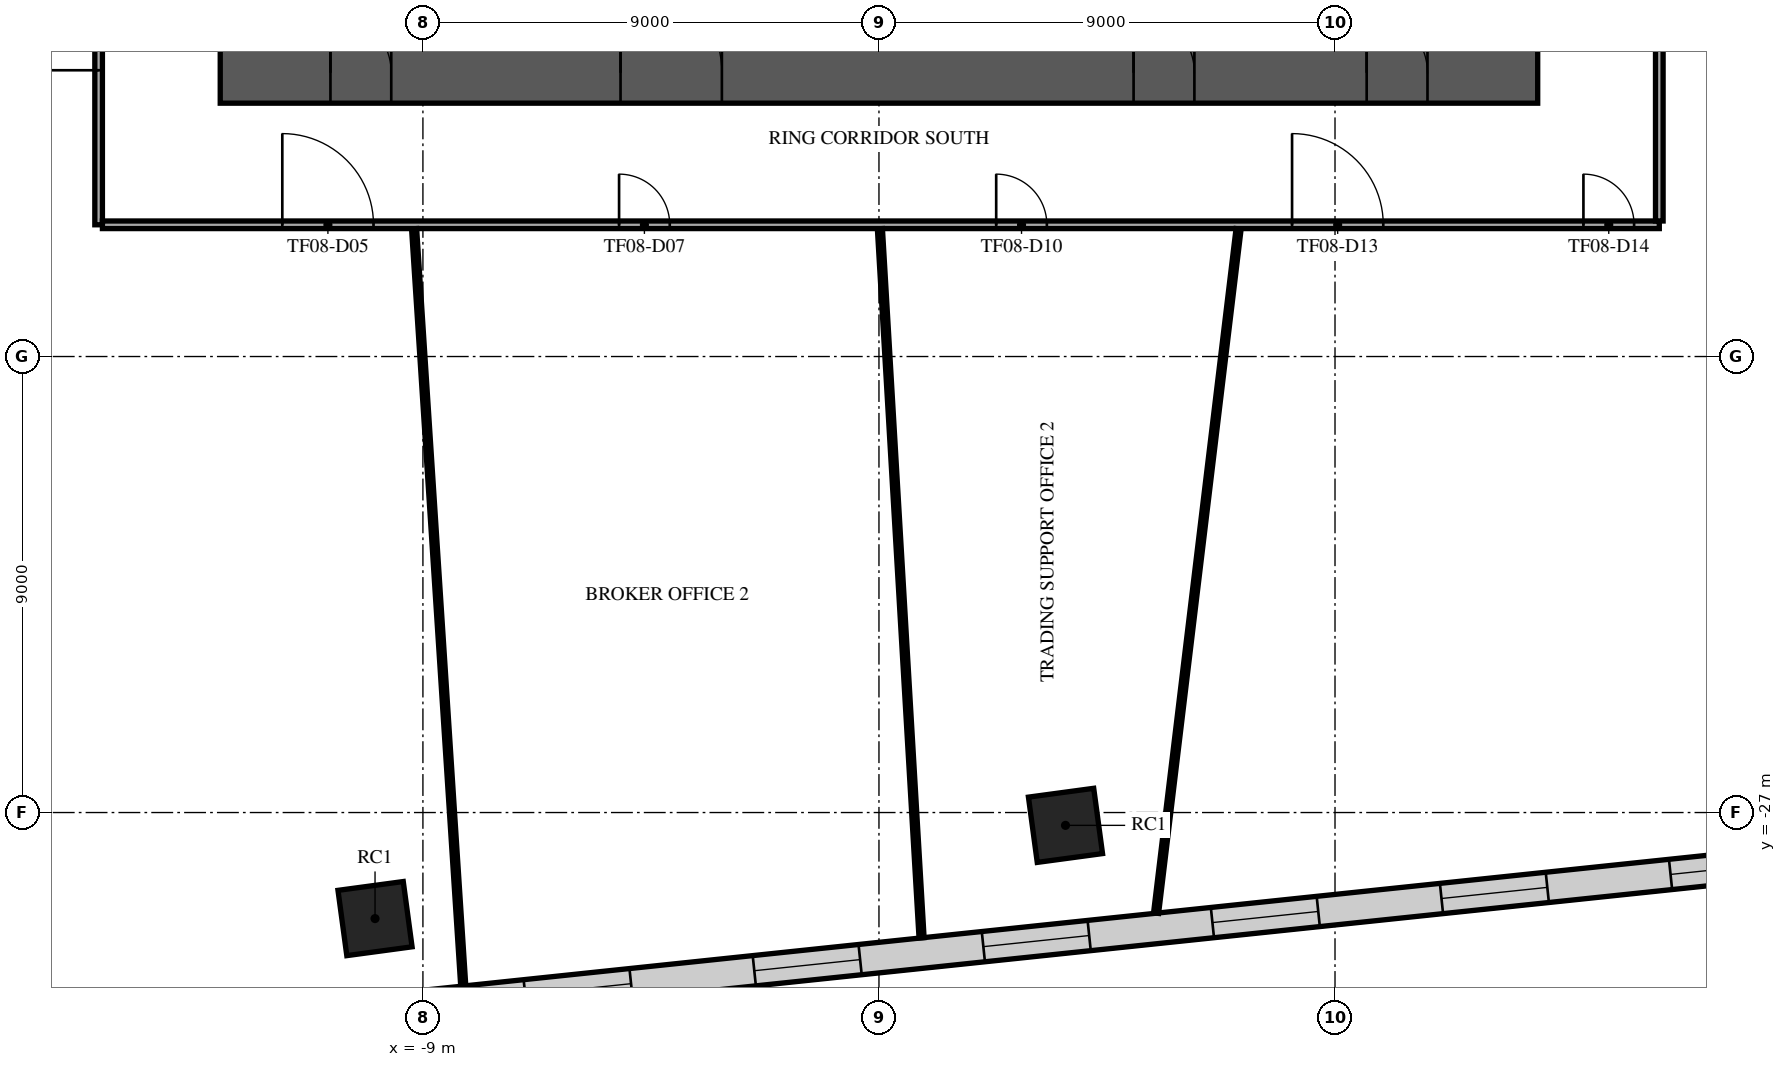
"""IFC4 building model, lengths in metres.
Left out: names, types, materials, properties, quantities, classifications, styles, units other than length and angle.
Written with IfcOpenShell. Run it as: python <this file> out.ifc"""

import sys

from ifc_helpers import new_model, si_unit, direction, frame, frame_2d, origin, origin_2d, place, context, subcontext, project, spatial, rectangle, extrude, element, fill, save


model = new_model("IFC4")
c1 = context("Model", 3, precision=1e-05, world=origin(), true_north=direction((0.0, 1.0)))
c2 = subcontext(c1, "Body", "Model", "MODEL_VIEW")
j1 = project(units=[si_unit("LENGTHUNIT", "METRE"), si_unit("PLANEANGLEUNIT", "RADIAN")], contexts=[c1])
p1 = place(None, origin())
s1 = spatial("IfcSite", under=j1, at=p1, CompositionType="ELEMENT")
p2 = place(p1, origin())
s2 = spatial("IfcBuilding", under=s1, at=p2, CompositionType="ELEMENT")
p3 = place(p2, frame((0.0, 0.0, 36.9)))
s3 = spatial("IfcBuildingStorey", under=s2, at=p3, CompositionType="ELEMENT", Elevation=36.9)
for number, where, z_axis, x_axis in (
    (1, (-9.945, -29.093, 0.0), (0.0, 0.0, 1.0), (0.991, 0.134, 0.0)),
    (2, (3.681, -27.253, 0.0), (0.0, 0.0, 1.0), (0.991, 0.134, 0.0)),
):
    element("IfcColumn", number, at=place(p3, frame(where, z_axis=z_axis, x_axis=x_axis)), inside=s3, PredefinedType="COLUMN", context=c2, shape_type="SweptSolid", body=[
        extrude(rectangle(XDim=1.3, YDim=1.3, at=origin_2d()), origin(), (0.0, 0.0, 1.0), 4.8),
    ])
p4 = place(p3, frame((-13.0, -12.4, 0.0), z_axis=(0.0, 0.0, 1.0), x_axis=(1.0, 0.0, 0.0)))
e3 = element("IfcWall", 3, at=p4, inside=s3, PredefinedType="SHEAR", context=c2, shape_type="SweptSolid", body=[
    extrude(rectangle(XDim=26.0, YDim=1.2, at=frame_2d((13.0, 0.0))), origin(), (0.0, 0.0, 1.0), 4.35),
])
p5 = place(p4, frame((7.9, 0.0, 0.0)))
e4 = element("IfcOpeningElement", 4, at=p5, cuts=e3, PredefinedType="OPENING", context=c2, shape_type="SweptSolid", body=[
    extrude(rectangle(XDim=2.0, YDim=2.1, at=frame_2d((1.0, 1.05))), frame((0.0, 0.61, 0.0), z_axis=(0.0, -1.0, 0.0), x_axis=(1.0, 0.0, 0.0)), (0.0, 0.0, 1.0), 1.22),
])
p6 = place(p4, frame((18.025, 0.0, 0.0)))
e5 = element("IfcOpeningElement", 5, at=p6, cuts=e3, PredefinedType="OPENING", context=c2, shape_type="SweptSolid", body=[
    extrude(rectangle(XDim=1.2, YDim=2.1, at=frame_2d((0.6, 1.05))), frame((0.0, 0.61, 0.0), z_axis=(0.0, -1.0, 0.0), x_axis=(1.0, 0.0, 0.0)), (0.0, 0.0, 1.0), 1.22),
])
p7 = place(p4, frame((2.175, 0.0, 0.0)))
e6 = element("IfcOpeningElement", 6, at=p7, cuts=e3, PredefinedType="OPENING", context=c2, shape_type="SweptSolid", body=[
    extrude(rectangle(XDim=1.2, YDim=2.1, at=frame_2d((0.6, 1.05))), frame((0.0, 0.61, 0.0), z_axis=(0.0, -1.0, 0.0), x_axis=(1.0, 0.0, 0.0)), (0.0, 0.0, 1.0), 1.22),
])
p8 = place(p4, frame((22.625, 0.0, 0.0)))
e7 = element("IfcOpeningElement", 7, at=p8, cuts=e3, PredefinedType="OPENING", context=c2, shape_type="SweptSolid", body=[
    extrude(rectangle(XDim=1.2, YDim=2.1, at=frame_2d((0.6, 1.05))), frame((0.0, 0.61, 0.0), z_axis=(0.0, -1.0, 0.0), x_axis=(1.0, 0.0, 0.0)), (0.0, 0.0, 1.0), 1.22),
])
p9 = place(p3, frame((-21.635, -32.137, 0.0), z_axis=(0.0, 0.0, 1.0), x_axis=(0.994521923397, 0.104528196591, 0.0)))
e8 = element("IfcWall", 8, at=p9, inside=s3, PredefinedType="STANDARD", context=c2, shape_type="SweptSolid", body=[
    extrude(rectangle(XDim=49.751, YDim=0.6, at=frame_2d((24.876, 0.0))), origin(), (0.0, 0.0, 1.0), 4.35),
])
p10 = place(p9, frame((1.161, 0.0, 0.9)))
e9 = element("IfcOpeningElement", 9, at=p10, cuts=e8, PredefinedType="OPENING", context=c2, shape_type="SweptSolid", body=[
    extrude(rectangle(XDim=2.1, YDim=2.7, at=frame_2d((1.05, 1.35))), frame((0.0, 0.31, 0.0), z_axis=(0.0, -1.0, 0.0), x_axis=(1.0, 0.0, 0.0)), (0.0, 0.0, 1.0), 0.62),
])
p11 = place(p9, frame((5.644, 0.0, 0.9)))
e10 = element("IfcOpeningElement", 10, at=p11, cuts=e8, PredefinedType="OPENING", context=c2, shape_type="SweptSolid", body=[
    extrude(rectangle(XDim=2.1, YDim=2.7, at=frame_2d((1.05, 1.35))), frame((0.0, 0.31, 0.0), z_axis=(0.0, -1.0, 0.0), x_axis=(1.0, 0.0, 0.0)), (0.0, 0.0, 1.0), 0.62),
])
p12 = place(p9, frame((10.189, 0.0, 0.9)))
e11 = element("IfcOpeningElement", 11, at=p12, cuts=e8, PredefinedType="OPENING", context=c2, shape_type="SweptSolid", body=[
    extrude(rectangle(XDim=2.1, YDim=2.7, at=frame_2d((1.05, 1.35))), frame((0.0, 0.31, 0.0), z_axis=(0.0, -1.0, 0.0), x_axis=(1.0, 0.0, 0.0)), (0.0, 0.0, 1.0), 0.62),
])
p13 = place(p9, frame((14.735, 0.0, 0.9)))
e12 = element("IfcOpeningElement", 12, at=p13, cuts=e8, PredefinedType="OPENING", context=c2, shape_type="SweptSolid", body=[
    extrude(rectangle(XDim=2.1, YDim=2.7, at=frame_2d((1.05, 1.35))), frame((0.0, 0.31, 0.0), z_axis=(0.0, -1.0, 0.0), x_axis=(1.0, 0.0, 0.0)), (0.0, 0.0, 1.0), 0.62),
])
p14 = place(p9, frame((19.28, 0.0, 0.9)))
e13 = element("IfcOpeningElement", 13, at=p14, cuts=e8, PredefinedType="OPENING", context=c2, shape_type="SweptSolid", body=[
    extrude(rectangle(XDim=2.1, YDim=2.7, at=frame_2d((1.05, 1.35))), frame((0.0, 0.31, 0.0), z_axis=(0.0, -1.0, 0.0), x_axis=(1.0, 0.0, 0.0)), (0.0, 0.0, 1.0), 0.62),
])
p15 = place(p9, frame((23.826, 0.0, 0.9)))
e14 = element("IfcOpeningElement", 14, at=p15, cuts=e8, PredefinedType="OPENING", context=c2, shape_type="SweptSolid", body=[
    extrude(rectangle(XDim=2.1, YDim=2.7, at=frame_2d((1.05, 1.35))), frame((0.0, 0.31, 0.0), z_axis=(0.0, -1.0, 0.0), x_axis=(1.0, 0.0, 0.0)), (0.0, 0.0, 1.0), 0.62),
])
p16 = place(p9, frame((28.371, 0.0, 0.9)))
e15 = element("IfcOpeningElement", 15, at=p16, cuts=e8, PredefinedType="OPENING", context=c2, shape_type="SweptSolid", body=[
    extrude(rectangle(XDim=2.1, YDim=2.7, at=frame_2d((1.05, 1.35))), frame((0.0, 0.31, 0.0), z_axis=(0.0, -1.0, 0.0), x_axis=(1.0, 0.0, 0.0)), (0.0, 0.0, 1.0), 0.62),
])
p17 = place(p9, frame((32.917, 0.0, 0.9)))
e16 = element("IfcOpeningElement", 16, at=p17, cuts=e8, PredefinedType="OPENING", context=c2, shape_type="SweptSolid", body=[
    extrude(rectangle(XDim=2.1, YDim=2.7, at=frame_2d((1.05, 1.35))), frame((0.0, 0.31, 0.0), z_axis=(0.0, -1.0, 0.0), x_axis=(1.0, 0.0, 0.0)), (0.0, 0.0, 1.0), 0.62),
])
p18 = place(p9, frame((37.462, 0.0, 0.9)))
e17 = element("IfcOpeningElement", 17, at=p18, cuts=e8, PredefinedType="OPENING", context=c2, shape_type="SweptSolid", body=[
    extrude(rectangle(XDim=2.1, YDim=2.7, at=frame_2d((1.05, 1.35))), frame((0.0, 0.31, 0.0), z_axis=(0.0, -1.0, 0.0), x_axis=(1.0, 0.0, 0.0)), (0.0, 0.0, 1.0), 0.62),
])
p19 = place(p9, frame((42.008, 0.0, 0.9)))
e18 = element("IfcOpeningElement", 18, at=p19, cuts=e8, PredefinedType="OPENING", context=c2, shape_type="SweptSolid", body=[
    extrude(rectangle(XDim=2.1, YDim=2.7, at=frame_2d((1.05, 1.35))), frame((0.0, 0.31, 0.0), z_axis=(0.0, -1.0, 0.0), x_axis=(1.0, 0.0, 0.0)), (0.0, 0.0, 1.0), 0.62),
])
p20 = place(p9, frame((46.491, 0.0, 0.9)))
e19 = element("IfcOpeningElement", 19, at=p20, cuts=e8, PredefinedType="OPENING", context=c2, shape_type="SweptSolid", body=[
    extrude(rectangle(XDim=2.1, YDim=2.7, at=frame_2d((1.05, 1.35))), frame((0.0, 0.31, 0.0), z_axis=(0.0, -1.0, 0.0), x_axis=(1.0, 0.0, 0.0)), (0.0, 0.0, 1.0), 0.62),
])
p21 = place(p3, frame((-15.4, -15.4, 0.0), z_axis=(0.0, 0.0, 1.0), x_axis=(0.0, 1.0, 0.0)))
e20 = element("IfcWall", 20, at=p21, inside=s3, PredefinedType="PARTITIONING", context=c2, shape_type="SweptSolid", body=[
    extrude(rectangle(XDim=30.8, YDim=0.15, at=frame_2d((15.4, 0.0))), origin(), (0.0, 0.0, 1.0), 3.85),
])
p22 = place(p21, frame((17.735, 0.0, 0.0)))
e21 = element("IfcOpeningElement", 21, at=p22, cuts=e20, PredefinedType="OPENING", context=c2, shape_type="SweptSolid", body=[
    extrude(rectangle(XDim=1.0, YDim=2.1, at=frame_2d((0.5, 1.05))), frame((0.0, 0.085, 0.0), z_axis=(0.0, -1.0, 0.0), x_axis=(1.0, 0.0, 0.0)), (0.0, 0.0, 1.0), 0.17),
])
p23 = place(p21, frame((9.836, 0.0, 0.0)))
e22 = element("IfcOpeningElement", 22, at=p23, cuts=e20, PredefinedType="OPENING", context=c2, shape_type="SweptSolid", body=[
    extrude(rectangle(XDim=1.0, YDim=2.1, at=frame_2d((0.5, 1.05))), frame((0.0, 0.085, 0.0), z_axis=(0.0, -1.0, 0.0), x_axis=(1.0, 0.0, 0.0)), (0.0, 0.0, 1.0), 0.17),
])
p24 = place(p21, frame((25.96, 0.0, 0.0)))
e23 = element("IfcOpeningElement", 23, at=p24, cuts=e20, PredefinedType="OPENING", context=c2, shape_type="SweptSolid", body=[
    extrude(rectangle(XDim=1.0, YDim=2.1, at=frame_2d((0.5, 1.05))), frame((0.0, 0.085, 0.0), z_axis=(0.0, -1.0, 0.0), x_axis=(1.0, 0.0, 0.0)), (0.0, 0.0, 1.0), 0.17),
])
p25 = place(p21, frame((3.05, 0.0, 0.0)))
e24 = element("IfcOpeningElement", 24, at=p25, cuts=e20, PredefinedType="OPENING", context=c2, shape_type="SweptSolid", body=[
    extrude(rectangle(XDim=1.0, YDim=2.1, at=frame_2d((0.5, 1.05))), frame((0.0, 0.085, 0.0), z_axis=(0.0, -1.0, 0.0), x_axis=(1.0, 0.0, 0.0)), (0.0, 0.0, 1.0), 0.17),
])
p26 = place(p3, frame((-15.325, -15.4, 0.0), z_axis=(0.0, 0.0, 1.0), x_axis=(1.0, 0.0, 0.0)))
e25 = element("IfcWall", 25, at=p26, inside=s3, PredefinedType="PARTITIONING", context=c2, shape_type="SweptSolid", body=[
    extrude(rectangle(XDim=30.725, YDim=0.15, at=frame_2d((15.362, 0.0))), origin(), (0.0, 0.0, 1.0), 3.85),
])
p27 = place(p26, frame((3.55, 0.0, 0.0)))
e26 = element("IfcOpeningElement", 26, at=p27, cuts=e25, PredefinedType="OPENING", context=c2, shape_type="SweptSolid", body=[
    extrude(rectangle(XDim=1.8, YDim=2.1, at=frame_2d((0.9, 1.05))), frame((0.0, 0.085, 0.0), z_axis=(0.0, -1.0, 0.0), x_axis=(1.0, 0.0, 0.0)), (0.0, 0.0, 1.0), 0.17),
])
p28 = place(p26, frame((10.196, 0.0, 0.0)))
e27 = element("IfcOpeningElement", 27, at=p28, cuts=e25, PredefinedType="OPENING", context=c2, shape_type="SweptSolid", body=[
    extrude(rectangle(XDim=1.0, YDim=2.1, at=frame_2d((0.5, 1.05))), frame((0.0, 0.085, 0.0), z_axis=(0.0, -1.0, 0.0), x_axis=(1.0, 0.0, 0.0)), (0.0, 0.0, 1.0), 0.17),
])
p29 = place(p26, frame((17.638, 0.0, 0.0)))
e28 = element("IfcOpeningElement", 28, at=p29, cuts=e25, PredefinedType="OPENING", context=c2, shape_type="SweptSolid", body=[
    extrude(rectangle(XDim=1.0, YDim=2.1, at=frame_2d((0.5, 1.05))), frame((0.0, 0.085, 0.0), z_axis=(0.0, -1.0, 0.0), x_axis=(1.0, 0.0, 0.0)), (0.0, 0.0, 1.0), 0.17),
])
p30 = place(p26, frame((23.478, 0.0, 0.0)))
e29 = element("IfcOpeningElement", 29, at=p30, cuts=e25, PredefinedType="OPENING", context=c2, shape_type="SweptSolid", body=[
    extrude(rectangle(XDim=1.8, YDim=2.1, at=frame_2d((0.9, 1.05))), frame((0.0, 0.085, 0.0), z_axis=(0.0, -1.0, 0.0), x_axis=(1.0, 0.0, 0.0)), (0.0, 0.0, 1.0), 0.17),
])
p31 = place(p26, frame((29.228, 0.0, 0.0)))
e30 = element("IfcOpeningElement", 30, at=p31, cuts=e25, PredefinedType="OPENING", context=c2, shape_type="SweptSolid", body=[
    extrude(rectangle(XDim=1.0, YDim=2.1, at=frame_2d((0.5, 1.05))), frame((0.0, 0.085, 0.0), z_axis=(0.0, -1.0, 0.0), x_axis=(1.0, 0.0, 0.0)), (0.0, 0.0, 1.0), 0.17),
])
p32 = place(p3, frame((15.4, -15.325, 0.0), z_axis=(0.0, 0.0, 1.0), x_axis=(0.0, 1.0, 0.0)))
e31 = element("IfcWall", 31, at=p32, inside=s3, PredefinedType="PARTITIONING", context=c2, shape_type="SweptSolid", body=[
    extrude(rectangle(XDim=30.65, YDim=0.15, at=frame_2d((15.325, 0.0))), origin(), (0.0, 0.0, 1.0), 3.85),
])
p33 = place(p32, frame((19.986, 0.0, 0.0)))
e32 = element("IfcOpeningElement", 32, at=p33, cuts=e31, PredefinedType="OPENING", context=c2, shape_type="SweptSolid", body=[
    extrude(rectangle(XDim=1.0, YDim=2.1, at=frame_2d((0.5, 1.05))), frame((0.0, 0.085, 0.0), z_axis=(0.0, -1.0, 0.0), x_axis=(1.0, 0.0, 0.0)), (0.0, 0.0, 1.0), 0.17),
])
p34 = place(p32, frame((8.197, 0.0, 0.0)))
e33 = element("IfcOpeningElement", 33, at=p34, cuts=e31, PredefinedType="OPENING", context=c2, shape_type="SweptSolid", body=[
    extrude(rectangle(XDim=1.0, YDim=2.1, at=frame_2d((0.5, 1.05))), frame((0.0, 0.085, 0.0), z_axis=(0.0, -1.0, 0.0), x_axis=(1.0, 0.0, 0.0)), (0.0, 0.0, 1.0), 0.17),
])
p35 = place(p3, frame((-9.174, -15.478, 0.0), z_axis=(0.0, 0.0, 1.0), x_axis=(0.064755162469, -0.997901181948, 0.0)))
e34 = element("IfcWall", 34, at=p35, inside=s3, PredefinedType="PARTITIONING", context=c2, shape_type="SweptSolid", body=[
    extrude(rectangle(XDim=14.975, YDim=0.1, at=frame_2d((7.488, 0.0))), origin(), (0.0, 0.0, 1.0), 3.55),
])
p36 = place(p3, frame((0.019, -15.478, 0.0), z_axis=(0.0, 0.0, 1.0), x_axis=(0.058657702067, -0.998278154618, 0.0)))
e35 = element("IfcWall", 35, at=p36, inside=s3, PredefinedType="PARTITIONING", context=c2, shape_type="SweptSolid", body=[
    extrude(rectangle(XDim=14.018, YDim=0.1, at=frame_2d((7.009, 0.0))), origin(), (0.0, 0.0, 1.0), 3.55),
])
p37 = place(p3, frame((5.469, -28.985, 0.0), z_axis=(0.0, 0.0, 1.0), x_axis=(0.119701505931, 0.992809926158, 0.0)))
e36 = element("IfcWall", 36, at=p37, inside=s3, PredefinedType="PARTITIONING", context=c2, shape_type="SweptSolid", body=[
    extrude(rectangle(XDim=13.602, YDim=0.1, at=frame_2d((6.801, 0.0))), origin(), (0.0, 0.0, 1.0), 3.55),
])
p38 = place(p5, origin())
e37 = element("IfcDoor", 37, at=p38, inside=s3, OperationType="SINGLE_SWING_LEFT", PredefinedType="DOOR", context=c2, shape_type="SweptSolid", body=[
    extrude(rectangle(XDim=2.0, YDim=2.1, at=frame_2d((1.0, 1.05))), frame((0.0, 0.025, 0.0), z_axis=(0.0, -1.0, 0.0), x_axis=(1.0, 0.0, 0.0)), (0.0, 0.0, 1.0), 0.05),
])
fill(e4, e37)
p39 = place(p6, origin())
e38 = element("IfcDoor", 38, at=p39, inside=s3, OperationType="SINGLE_SWING_LEFT", PredefinedType="DOOR", context=c2, shape_type="SweptSolid", body=[
    extrude(rectangle(XDim=1.2, YDim=2.1, at=frame_2d((0.6, 1.05))), frame((0.0, 0.025, 0.0), z_axis=(0.0, -1.0, 0.0), x_axis=(1.0, 0.0, 0.0)), (0.0, 0.0, 1.0), 0.05),
])
fill(e5, e38)
p40 = place(p7, origin())
e39 = element("IfcDoor", 39, at=p40, inside=s3, OperationType="SINGLE_SWING_LEFT", PredefinedType="DOOR", context=c2, shape_type="SweptSolid", body=[
    extrude(rectangle(XDim=1.2, YDim=2.1, at=frame_2d((0.6, 1.05))), frame((0.0, 0.025, 0.0), z_axis=(0.0, -1.0, 0.0), x_axis=(1.0, 0.0, 0.0)), (0.0, 0.0, 1.0), 0.05),
])
fill(e6, e39)
p41 = place(p8, origin())
e40 = element("IfcDoor", 40, at=p41, inside=s3, OperationType="SINGLE_SWING_LEFT", PredefinedType="DOOR", context=c2, shape_type="SweptSolid", body=[
    extrude(rectangle(XDim=1.2, YDim=2.1, at=frame_2d((0.6, 1.05))), frame((0.0, 0.025, 0.0), z_axis=(0.0, -1.0, 0.0), x_axis=(1.0, 0.0, 0.0)), (0.0, 0.0, 1.0), 0.05),
])
fill(e7, e40)
p42 = place(p13, origin())
e41 = element("IfcWindow", 41, at=p42, inside=s3, PartitioningType="SINGLE_PANEL", PredefinedType="WINDOW", context=c2, shape_type="SweptSolid", body=[
    extrude(rectangle(XDim=2.1, YDim=2.7, at=frame_2d((1.05, 1.35))), frame((0.0, 0.03, 0.0), z_axis=(0.0, -1.0, 0.0), x_axis=(1.0, 0.0, 0.0)), (0.0, 0.0, 1.0), 0.06),
])
fill(e12, e41)
p43 = place(p14, origin())
e42 = element("IfcWindow", 42, at=p43, inside=s3, PartitioningType="SINGLE_PANEL", PredefinedType="WINDOW", context=c2, shape_type="SweptSolid", body=[
    extrude(rectangle(XDim=2.1, YDim=2.7, at=frame_2d((1.05, 1.35))), frame((0.0, 0.03, 0.0), z_axis=(0.0, -1.0, 0.0), x_axis=(1.0, 0.0, 0.0)), (0.0, 0.0, 1.0), 0.06),
])
fill(e13, e42)
p44 = place(p15, origin())
e43 = element("IfcWindow", 43, at=p44, inside=s3, PartitioningType="SINGLE_PANEL", PredefinedType="WINDOW", context=c2, shape_type="SweptSolid", body=[
    extrude(rectangle(XDim=2.1, YDim=2.7, at=frame_2d((1.05, 1.35))), frame((0.0, 0.03, 0.0), z_axis=(0.0, -1.0, 0.0), x_axis=(1.0, 0.0, 0.0)), (0.0, 0.0, 1.0), 0.06),
])
fill(e14, e43)
p45 = place(p16, origin())
e44 = element("IfcWindow", 44, at=p45, inside=s3, PartitioningType="SINGLE_PANEL", PredefinedType="WINDOW", context=c2, shape_type="SweptSolid", body=[
    extrude(rectangle(XDim=2.1, YDim=2.7, at=frame_2d((1.05, 1.35))), frame((0.0, 0.03, 0.0), z_axis=(0.0, -1.0, 0.0), x_axis=(1.0, 0.0, 0.0)), (0.0, 0.0, 1.0), 0.06),
])
fill(e15, e44)
p46 = place(p17, origin())
e45 = element("IfcWindow", 45, at=p46, inside=s3, PartitioningType="SINGLE_PANEL", PredefinedType="WINDOW", context=c2, shape_type="SweptSolid", body=[
    extrude(rectangle(XDim=2.1, YDim=2.7, at=frame_2d((1.05, 1.35))), frame((0.0, 0.03, 0.0), z_axis=(0.0, -1.0, 0.0), x_axis=(1.0, 0.0, 0.0)), (0.0, 0.0, 1.0), 0.06),
])
fill(e16, e45)
p47 = place(p18, origin())
e46 = element("IfcWindow", 46, at=p47, inside=s3, PartitioningType="SINGLE_PANEL", PredefinedType="WINDOW", context=c2, shape_type="SweptSolid", body=[
    extrude(rectangle(XDim=2.1, YDim=2.7, at=frame_2d((1.05, 1.35))), frame((0.0, 0.03, 0.0), z_axis=(0.0, -1.0, 0.0), x_axis=(1.0, 0.0, 0.0)), (0.0, 0.0, 1.0), 0.06),
])
fill(e17, e46)
p48 = place(p27, frame((1.8, 0.0, 0.0), z_axis=(0.0, 0.0, 1.0), x_axis=(-1.0, 0.0, 0.0)))
e47 = element("IfcDoor", 47, at=p48, inside=s3, OperationType="DOUBLE_DOOR_SINGLE_SWING", PredefinedType="DOOR", context=c2, shape_type="SweptSolid", body=[
    extrude(rectangle(XDim=1.8, YDim=2.1, at=frame_2d((0.9, 1.05))), frame((0.0, 0.025, 0.0), z_axis=(0.0, -1.0, 0.0), x_axis=(1.0, 0.0, 0.0)), (0.0, 0.0, 1.0), 0.05),
])
fill(e26, e47)
p49 = place(p25, origin())
e48 = element("IfcDoor", 48, at=p49, inside=s3, OperationType="SINGLE_SWING_LEFT", PredefinedType="DOOR", context=c2, shape_type="SweptSolid", body=[
    extrude(rectangle(XDim=1.0, YDim=2.1, at=frame_2d((0.5, 1.05))), frame((0.0, 0.025, 0.0), z_axis=(0.0, -1.0, 0.0), x_axis=(1.0, 0.0, 0.0)), (0.0, 0.0, 1.0), 0.05),
])
fill(e24, e48)
p50 = place(p28, frame((1.0, 0.0, 0.0), z_axis=(0.0, 0.0, 1.0), x_axis=(-1.0, 0.0, 0.0)))
e49 = element("IfcDoor", 49, at=p50, inside=s3, OperationType="SINGLE_SWING_RIGHT", PredefinedType="DOOR", context=c2, shape_type="SweptSolid", body=[
    extrude(rectangle(XDim=1.0, YDim=2.1, at=frame_2d((0.5, 1.05))), frame((0.0, 0.025, 0.0), z_axis=(0.0, -1.0, 0.0), x_axis=(1.0, 0.0, 0.0)), (0.0, 0.0, 1.0), 0.05),
])
fill(e27, e49)
p51 = place(p29, frame((1.0, 0.0, 0.0), z_axis=(0.0, 0.0, 1.0), x_axis=(-1.0, 0.0, 0.0)))
e50 = element("IfcDoor", 50, at=p51, inside=s3, OperationType="SINGLE_SWING_RIGHT", PredefinedType="DOOR", context=c2, shape_type="SweptSolid", body=[
    extrude(rectangle(XDim=1.0, YDim=2.1, at=frame_2d((0.5, 1.05))), frame((0.0, 0.025, 0.0), z_axis=(0.0, -1.0, 0.0), x_axis=(1.0, 0.0, 0.0)), (0.0, 0.0, 1.0), 0.05),
])
fill(e28, e50)
p52 = place(p30, frame((1.8, 0.0, 0.0), z_axis=(0.0, 0.0, 1.0), x_axis=(-1.0, 0.0, 0.0)))
e51 = element("IfcDoor", 51, at=p52, inside=s3, OperationType="DOUBLE_DOOR_SINGLE_SWING", PredefinedType="DOOR", context=c2, shape_type="SweptSolid", body=[
    extrude(rectangle(XDim=1.8, YDim=2.1, at=frame_2d((0.9, 1.05))), frame((0.0, 0.025, 0.0), z_axis=(0.0, -1.0, 0.0), x_axis=(1.0, 0.0, 0.0)), (0.0, 0.0, 1.0), 0.05),
])
fill(e29, e51)
p53 = place(p31, frame((1.0, 0.0, 0.0), z_axis=(0.0, 0.0, 1.0), x_axis=(-1.0, 0.0, 0.0)))
e52 = element("IfcDoor", 52, at=p53, inside=s3, OperationType="SINGLE_SWING_LEFT", PredefinedType="DOOR", context=c2, shape_type="SweptSolid", body=[
    extrude(rectangle(XDim=1.0, YDim=2.1, at=frame_2d((0.5, 1.05))), frame((0.0, 0.025, 0.0), z_axis=(0.0, -1.0, 0.0), x_axis=(1.0, 0.0, 0.0)), (0.0, 0.0, 1.0), 0.05),
])
fill(e30, e52)
save(model, sys.argv[1])
